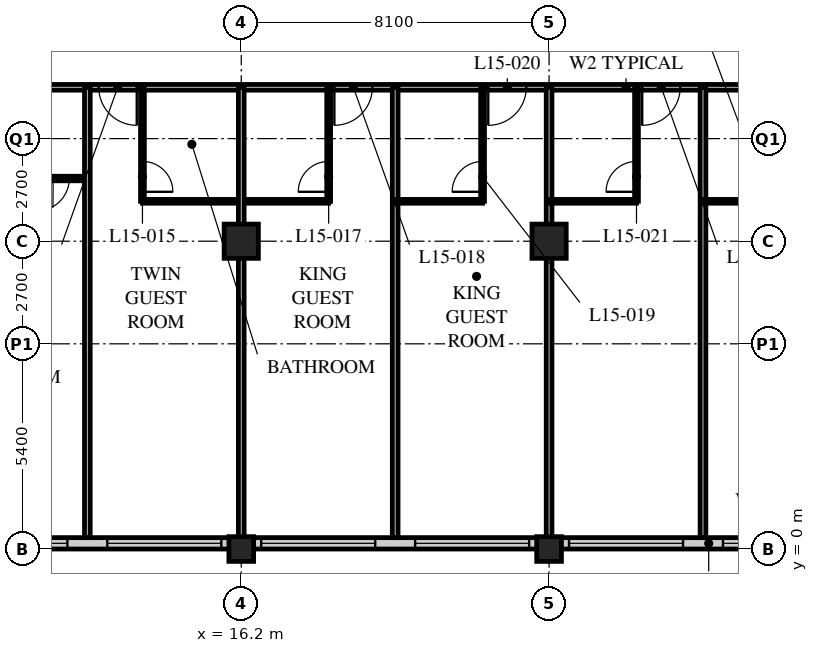
"""IFC4 building model, lengths in metres.
Left out: names, types, materials, properties, quantities, classifications, styles, units other than length and angle.
Written with IfcOpenShell. Run it as: python <this file> out.ifc"""

import sys

from ifc_helpers import new_model, si_unit, direction, frame, frame_2d, origin, origin_2d, place, context, subcontext, project, spatial, rectangle, hollow_rectangle, extrude, element, fill, save


model = new_model("IFC4")
c1 = context("Model", 3, precision=1e-05, world=origin(), true_north=direction((0.0, 1.0)))
c2 = subcontext(c1, "Body", "Model", "MODEL_VIEW")
j1 = project(units=[si_unit("LENGTHUNIT", "METRE"), si_unit("PLANEANGLEUNIT", "RADIAN")], contexts=[c1])
p1 = place(None, origin())
s1 = spatial("IfcSite", under=j1, at=p1, CompositionType="ELEMENT")
p2 = place(p1, origin())
s2 = spatial("IfcBuilding", under=s1, at=p2, CompositionType="ELEMENT")
p3 = place(p2, frame((0.0, 0.0, 63.6)))
s3 = spatial("IfcBuildingStorey", under=s2, at=p3, CompositionType="ELEMENT", Elevation=63.6)
p4 = place(p3, frame((16.2, 0.0, 0.0), z_axis=(0.0, 0.0, 1.0), x_axis=(1.0, 0.0, 0.0)))
e1 = element("IfcColumn", 1, at=p4, inside=s3, PredefinedType="COLUMN", context=c2, shape_type="SweptSolid", body=[
    extrude(hollow_rectangle(XDim=0.65, YDim=0.65, WallThickness=0.05, at=origin_2d()), origin(), (0.0, 0.0, 1.0), 3.4),
])
p5 = place(p3, frame((16.2, 8.1, 0.0), z_axis=(0.0, 0.0, 1.0), x_axis=(1.0, 0.0, 0.0)))
e2 = element("IfcColumn", 2, at=p5, inside=s3, PredefinedType="COLUMN", context=c2, shape_type="SweptSolid", body=[
    extrude(hollow_rectangle(XDim=0.9, YDim=0.9, WallThickness=0.09, at=origin_2d()), origin(), (0.0, 0.0, 1.0), 3.4),
])
p6 = place(p3, frame((24.3, 0.0, 0.0), z_axis=(0.0, 0.0, 1.0), x_axis=(1.0, 0.0, 0.0)))
e3 = element("IfcColumn", 3, at=p6, inside=s3, PredefinedType="COLUMN", context=c2, shape_type="SweptSolid", body=[
    extrude(hollow_rectangle(XDim=0.65, YDim=0.65, WallThickness=0.05, at=origin_2d()), origin(), (0.0, 0.0, 1.0), 3.4),
])
p7 = place(p3, frame((24.3, 8.1, 0.0), z_axis=(0.0, 0.0, 1.0), x_axis=(1.0, 0.0, 0.0)))
e4 = element("IfcColumn", 4, at=p7, inside=s3, PredefinedType="COLUMN", context=c2, shape_type="SweptSolid", body=[
    extrude(hollow_rectangle(XDim=0.9, YDim=0.9, WallThickness=0.09, at=origin_2d()), origin(), (0.0, 0.0, 1.0), 3.4),
])
p8 = place(p3, frame((8.4, 0.15, 0.0), z_axis=(0.0, 0.0, 1.0), x_axis=(1.0, 0.0, 0.0)))
e5 = element("IfcWall", 5, at=p8, inside=s3, PredefinedType="SOLIDWALL", context=c2, shape_type="SweptSolid", body=[
    extrude(rectangle(XDim=40.2, YDim=0.3, at=frame_2d((20.1, 0.0))), origin(), (0.0, 0.0, 1.0), 3.19),
])
p9 = place(p8, frame((0.225, 0.0, 0.9)))
e6 = element("IfcOpeningElement", 6, at=p9, cuts=e5, PredefinedType="OPENING", context=c2, shape_type="SweptSolid", body=[
    extrude(rectangle(XDim=3.0, YDim=2.0, at=frame_2d((1.5, 1.0))), frame((0.0, 0.16, 0.0), z_axis=(0.0, -1.0, 0.0), x_axis=(1.0, 0.0, 0.0)), (0.0, 0.0, 1.0), 0.32),
])
p10 = place(p8, frame((4.275, 0.0, 0.9)))
e7 = element("IfcOpeningElement", 7, at=p10, cuts=e5, PredefinedType="OPENING", context=c2, shape_type="SweptSolid", body=[
    extrude(rectangle(XDim=3.0, YDim=2.0, at=frame_2d((1.5, 1.0))), frame((0.0, 0.16, 0.0), z_axis=(0.0, -1.0, 0.0), x_axis=(1.0, 0.0, 0.0)), (0.0, 0.0, 1.0), 0.32),
])
p11 = place(p8, frame((8.325, 0.0, 0.9)))
e8 = element("IfcOpeningElement", 8, at=p11, cuts=e5, PredefinedType="OPENING", context=c2, shape_type="SweptSolid", body=[
    extrude(rectangle(XDim=3.0, YDim=2.0, at=frame_2d((1.5, 1.0))), frame((0.0, 0.16, 0.0), z_axis=(0.0, -1.0, 0.0), x_axis=(1.0, 0.0, 0.0)), (0.0, 0.0, 1.0), 0.32),
])
p12 = place(p8, frame((12.375, 0.0, 0.9)))
e9 = element("IfcOpeningElement", 9, at=p12, cuts=e5, PredefinedType="OPENING", context=c2, shape_type="SweptSolid", body=[
    extrude(rectangle(XDim=3.0, YDim=2.0, at=frame_2d((1.5, 1.0))), frame((0.0, 0.16, 0.0), z_axis=(0.0, -1.0, 0.0), x_axis=(1.0, 0.0, 0.0)), (0.0, 0.0, 1.0), 0.32),
])
p13 = place(p8, frame((16.425, 0.0, 0.9)))
e10 = element("IfcOpeningElement", 10, at=p13, cuts=e5, PredefinedType="OPENING", context=c2, shape_type="SweptSolid", body=[
    extrude(rectangle(XDim=3.0, YDim=2.0, at=frame_2d((1.5, 1.0))), frame((0.0, 0.16, 0.0), z_axis=(0.0, -1.0, 0.0), x_axis=(1.0, 0.0, 0.0)), (0.0, 0.0, 1.0), 0.32),
])
p14 = place(p8, frame((20.475, 0.0, 0.9)))
e11 = element("IfcOpeningElement", 11, at=p14, cuts=e5, PredefinedType="OPENING", context=c2, shape_type="SweptSolid", body=[
    extrude(rectangle(XDim=3.0, YDim=2.0, at=frame_2d((1.5, 1.0))), frame((0.0, 0.16, 0.0), z_axis=(0.0, -1.0, 0.0), x_axis=(1.0, 0.0, 0.0)), (0.0, 0.0, 1.0), 0.32),
])
p15 = place(p8, frame((24.525, 0.0, 0.9)))
e12 = element("IfcOpeningElement", 12, at=p15, cuts=e5, PredefinedType="OPENING", context=c2, shape_type="SweptSolid", body=[
    extrude(rectangle(XDim=3.0, YDim=2.0, at=frame_2d((1.5, 1.0))), frame((0.0, 0.16, 0.0), z_axis=(0.0, -1.0, 0.0), x_axis=(1.0, 0.0, 0.0)), (0.0, 0.0, 1.0), 0.32),
])
p16 = place(p8, frame((28.575, 0.0, 0.9)))
e13 = element("IfcOpeningElement", 13, at=p16, cuts=e5, PredefinedType="OPENING", context=c2, shape_type="SweptSolid", body=[
    extrude(rectangle(XDim=3.0, YDim=2.0, at=frame_2d((1.5, 1.0))), frame((0.0, 0.16, 0.0), z_axis=(0.0, -1.0, 0.0), x_axis=(1.0, 0.0, 0.0)), (0.0, 0.0, 1.0), 0.32),
])
p17 = place(p8, frame((32.625, 0.0, 0.9)))
e14 = element("IfcOpeningElement", 14, at=p17, cuts=e5, PredefinedType="OPENING", context=c2, shape_type="SweptSolid", body=[
    extrude(rectangle(XDim=3.0, YDim=2.0, at=frame_2d((1.5, 1.0))), frame((0.0, 0.16, 0.0), z_axis=(0.0, -1.0, 0.0), x_axis=(1.0, 0.0, 0.0)), (0.0, 0.0, 1.0), 0.32),
])
p18 = place(p8, frame((36.675, 0.0, 0.9)))
e15 = element("IfcOpeningElement", 15, at=p18, cuts=e5, PredefinedType="OPENING", context=c2, shape_type="SweptSolid", body=[
    extrude(rectangle(XDim=3.0, YDim=2.0, at=frame_2d((1.5, 1.0))), frame((0.0, 0.16, 0.0), z_axis=(0.0, -1.0, 0.0), x_axis=(1.0, 0.0, 0.0)), (0.0, 0.0, 1.0), 0.32),
])
p19 = place(p3, frame((8.1, 12.15, 0.0), z_axis=(0.0, 0.0, 1.0), x_axis=(1.0, 0.0, 0.0)))
e16 = element("IfcWall", 16, at=p19, inside=s3, PredefinedType="PARTITIONING", context=c2, shape_type="SweptSolid", body=[
    extrude(rectangle(XDim=36.45, YDim=0.15, at=frame_2d((18.225, 0.0))), origin(), (0.0, 0.0, 1.0), 3.19),
])
p20 = place(p19, frame((4.35, 0.0, 0.0)))
e17 = element("IfcOpeningElement", 17, at=p20, cuts=e16, PredefinedType="OPENING", context=c2, shape_type="SweptSolid", body=[
    extrude(rectangle(XDim=1.0, YDim=2.1, at=frame_2d((0.5, 1.05))), frame((0.0, 0.085, 0.0), z_axis=(0.0, -1.0, 0.0), x_axis=(1.0, 0.0, 0.0)), (0.0, 0.0, 1.0), 0.17),
])
p21 = place(p19, frame((10.55, 0.0, 0.0)))
e18 = element("IfcOpeningElement", 18, at=p21, cuts=e16, PredefinedType="OPENING", context=c2, shape_type="SweptSolid", body=[
    extrude(rectangle(XDim=1.0, YDim=2.1, at=frame_2d((0.5, 1.05))), frame((0.0, 0.085, 0.0), z_axis=(0.0, -1.0, 0.0), x_axis=(1.0, 0.0, 0.0)), (0.0, 0.0, 1.0), 0.17),
])
p22 = place(p19, frame((14.6, 0.0, 0.0)))
e19 = element("IfcOpeningElement", 19, at=p22, cuts=e16, PredefinedType="OPENING", context=c2, shape_type="SweptSolid", body=[
    extrude(rectangle(XDim=1.0, YDim=2.1, at=frame_2d((0.5, 1.05))), frame((0.0, 0.085, 0.0), z_axis=(0.0, -1.0, 0.0), x_axis=(1.0, 0.0, 0.0)), (0.0, 0.0, 1.0), 0.17),
])
p23 = place(p19, frame((18.65, 0.0, 0.0)))
e20 = element("IfcOpeningElement", 20, at=p23, cuts=e16, PredefinedType="OPENING", context=c2, shape_type="SweptSolid", body=[
    extrude(rectangle(XDim=1.0, YDim=2.1, at=frame_2d((0.5, 1.05))), frame((0.0, 0.085, 0.0), z_axis=(0.0, -1.0, 0.0), x_axis=(1.0, 0.0, 0.0)), (0.0, 0.0, 1.0), 0.17),
])
p24 = place(p19, frame((22.7, 0.0, 0.0)))
e21 = element("IfcOpeningElement", 21, at=p24, cuts=e16, PredefinedType="OPENING", context=c2, shape_type="SweptSolid", body=[
    extrude(rectangle(XDim=1.0, YDim=2.1, at=frame_2d((0.5, 1.05))), frame((0.0, 0.085, 0.0), z_axis=(0.0, -1.0, 0.0), x_axis=(1.0, 0.0, 0.0)), (0.0, 0.0, 1.0), 0.17),
])
p25 = place(p19, frame((24.6, 0.0, 0.0)))
e22 = element("IfcOpeningElement", 22, at=p25, cuts=e16, PredefinedType="OPENING", context=c2, shape_type="SweptSolid", body=[
    extrude(rectangle(XDim=1.0, YDim=2.1, at=frame_2d((0.5, 1.05))), frame((0.0, 0.085, 0.0), z_axis=(0.0, -1.0, 0.0), x_axis=(1.0, 0.0, 0.0)), (0.0, 0.0, 1.0), 0.17),
])
p26 = place(p19, frame((30.8, 0.0, 0.0)))
e23 = element("IfcOpeningElement", 23, at=p26, cuts=e16, PredefinedType="OPENING", context=c2, shape_type="SweptSolid", body=[
    extrude(rectangle(XDim=1.0, YDim=2.1, at=frame_2d((0.5, 1.05))), frame((0.0, 0.085, 0.0), z_axis=(0.0, -1.0, 0.0), x_axis=(1.0, 0.0, 0.0)), (0.0, 0.0, 1.0), 0.17),
])
p27 = place(p19, frame((1.525, 0.0, 0.0)))
e24 = element("IfcOpeningElement", 24, at=p27, cuts=e16, PredefinedType="OPENING", context=c2, shape_type="SweptSolid", body=[
    extrude(rectangle(XDim=1.0, YDim=2.1, at=frame_2d((0.5, 1.05))), frame((0.0, 0.085, 0.0), z_axis=(0.0, -1.0, 0.0), x_axis=(1.0, 0.0, 0.0)), (0.0, 0.0, 1.0), 0.17),
])
p28 = place(p19, frame((33.925, 0.0, 0.0)))
e25 = element("IfcOpeningElement", 25, at=p28, cuts=e16, PredefinedType="OPENING", context=c2, shape_type="SweptSolid", body=[
    extrude(rectangle(XDim=1.0, YDim=2.1, at=frame_2d((0.5, 1.05))), frame((0.0, 0.085, 0.0), z_axis=(0.0, -1.0, 0.0), x_axis=(1.0, 0.0, 0.0)), (0.0, 0.0, 1.0), 0.17),
])
p29 = place(p3, frame((13.6, 9.15, 0.0), z_axis=(0.0, 0.0, 1.0), x_axis=(1.0, 0.0, 0.0)))
e26 = element("IfcWall", 26, at=p29, inside=s3, PredefinedType="PARTITIONING", context=c2, shape_type="SweptSolid", body=[
    extrude(rectangle(XDim=4.9, YDim=0.1, at=frame_2d((2.45, 0.0))), origin(), (0.0, 0.0, 1.0), 3.19),
])
p30 = place(p3, frame((13.6, 12.15, 0.0), z_axis=(0.0, 0.0, 1.0), x_axis=(0.0, -1.0, 0.0)))
e27 = element("IfcWall", 27, at=p30, inside=s3, PredefinedType="PARTITIONING", context=c2, shape_type="SweptSolid", body=[
    extrude(rectangle(XDim=3.0, YDim=0.1, at=frame_2d((1.5, 0.0))), origin(), (0.0, 0.0, 1.0), 3.19),
])
p31 = place(p30, frame((1.95, 0.0, 0.0)))
e28 = element("IfcOpeningElement", 28, at=p31, cuts=e27, PredefinedType="OPENING", context=c2, shape_type="SweptSolid", body=[
    extrude(rectangle(XDim=0.8, YDim=2.1, at=frame_2d((0.4, 1.05))), frame((0.0, 0.06, 0.0), z_axis=(0.0, -1.0, 0.0), x_axis=(1.0, 0.0, 0.0)), (0.0, 0.0, 1.0), 0.12),
])
p32 = place(p3, frame((16.2, 12.15, 0.0), z_axis=(0.0, 0.0, 1.0), x_axis=(0.0, -1.0, 0.0)))
e29 = element("IfcWall", 29, at=p32, inside=s3, PredefinedType="PARTITIONING", context=c2, shape_type="SweptSolid", body=[
    extrude(rectangle(XDim=11.85, YDim=0.15, at=frame_2d((5.925, 0.0))), origin(), (0.0, 0.0, 1.0), 2.578),
])
p33 = place(p3, frame((18.5, 12.15, 0.0), z_axis=(0.0, 0.0, 1.0), x_axis=(0.0, -1.0, 0.0)))
e30 = element("IfcWall", 30, at=p33, inside=s3, PredefinedType="PARTITIONING", context=c2, shape_type="SweptSolid", body=[
    extrude(rectangle(XDim=3.0, YDim=0.1, at=frame_2d((1.5, 0.0))), origin(), (0.0, 0.0, 1.0), 3.19),
])
p34 = place(p33, frame((1.95, 0.0, 0.0)))
e31 = element("IfcOpeningElement", 31, at=p34, cuts=e30, PredefinedType="OPENING", context=c2, shape_type="SweptSolid", body=[
    extrude(rectangle(XDim=0.8, YDim=2.1, at=frame_2d((0.4, 1.05))), frame((0.0, 0.06, 0.0), z_axis=(0.0, -1.0, 0.0), x_axis=(1.0, 0.0, 0.0)), (0.0, 0.0, 1.0), 0.12),
])
p35 = place(p3, frame((20.25, 12.15, 0.0), z_axis=(0.0, 0.0, 1.0), x_axis=(0.0, -1.0, 0.0)))
e32 = element("IfcWall", 32, at=p35, inside=s3, PredefinedType="PARTITIONING", context=c2, shape_type="SweptSolid", body=[
    extrude(rectangle(XDim=11.85, YDim=0.15, at=frame_2d((5.925, 0.0))), origin(), (0.0, 0.0, 1.0), 3.19),
])
p36 = place(p3, frame((20.25, 9.15, 0.0), z_axis=(0.0, 0.0, 1.0), x_axis=(1.0, 0.0, 0.0)))
e33 = element("IfcWall", 33, at=p36, inside=s3, PredefinedType="PARTITIONING", context=c2, shape_type="SweptSolid", body=[
    extrude(rectangle(XDim=2.3, YDim=0.1, at=frame_2d((1.15, 0.0))), origin(), (0.0, 0.0, 1.0), 3.19),
])
p37 = place(p3, frame((22.55, 12.15, 0.0), z_axis=(0.0, 0.0, 1.0), x_axis=(0.0, -1.0, 0.0)))
e34 = element("IfcWall", 34, at=p37, inside=s3, PredefinedType="PARTITIONING", context=c2, shape_type="SweptSolid", body=[
    extrude(rectangle(XDim=3.0, YDim=0.1, at=frame_2d((1.5, 0.0))), origin(), (0.0, 0.0, 1.0), 3.19),
])
p38 = place(p37, frame((1.95, 0.0, 0.0)))
e35 = element("IfcOpeningElement", 35, at=p38, cuts=e34, PredefinedType="OPENING", context=c2, shape_type="SweptSolid", body=[
    extrude(rectangle(XDim=0.8, YDim=2.1, at=frame_2d((0.4, 1.05))), frame((0.0, 0.06, 0.0), z_axis=(0.0, -1.0, 0.0), x_axis=(1.0, 0.0, 0.0)), (0.0, 0.0, 1.0), 0.12),
])
p39 = place(p3, frame((24.3, 12.15, 0.0), z_axis=(0.0, 0.0, 1.0), x_axis=(0.0, -1.0, 0.0)))
e36 = element("IfcWall", 36, at=p39, inside=s3, PredefinedType="PARTITIONING", context=c2, shape_type="SweptSolid", body=[
    extrude(rectangle(XDim=11.85, YDim=0.15, at=frame_2d((5.925, 0.0))), origin(), (0.0, 0.0, 1.0), 2.578),
])
p40 = place(p3, frame((24.3, 9.15, 0.0), z_axis=(0.0, 0.0, 1.0), x_axis=(1.0, 0.0, 0.0)))
e37 = element("IfcWall", 37, at=p40, inside=s3, PredefinedType="PARTITIONING", context=c2, shape_type="SweptSolid", body=[
    extrude(rectangle(XDim=2.3, YDim=0.1, at=frame_2d((1.15, 0.0))), origin(), (0.0, 0.0, 1.0), 3.19),
])
p41 = place(p3, frame((26.6, 12.15, 0.0), z_axis=(0.0, 0.0, 1.0), x_axis=(0.0, -1.0, 0.0)))
e38 = element("IfcWall", 38, at=p41, inside=s3, PredefinedType="PARTITIONING", context=c2, shape_type="SweptSolid", body=[
    extrude(rectangle(XDim=3.0, YDim=0.1, at=frame_2d((1.5, 0.0))), origin(), (0.0, 0.0, 1.0), 3.19),
])
p42 = place(p41, frame((1.95, 0.0, 0.0)))
e39 = element("IfcOpeningElement", 39, at=p42, cuts=e38, PredefinedType="OPENING", context=c2, shape_type="SweptSolid", body=[
    extrude(rectangle(XDim=0.8, YDim=2.1, at=frame_2d((0.4, 1.05))), frame((0.0, 0.06, 0.0), z_axis=(0.0, -1.0, 0.0), x_axis=(1.0, 0.0, 0.0)), (0.0, 0.0, 1.0), 0.12),
])
p43 = place(p3, frame((28.35, 12.15, 0.0), z_axis=(0.0, 0.0, 1.0), x_axis=(0.0, -1.0, 0.0)))
e40 = element("IfcWall", 40, at=p43, inside=s3, PredefinedType="PARTITIONING", context=c2, shape_type="SweptSolid", body=[
    extrude(rectangle(XDim=11.85, YDim=0.15, at=frame_2d((5.925, 0.0))), origin(), (0.0, 0.0, 1.0), 3.19),
])
p44 = place(p3, frame((28.35, 9.15, 0.0), z_axis=(0.0, 0.0, 1.0), x_axis=(1.0, 0.0, 0.0)))
e41 = element("IfcWall", 41, at=p44, inside=s3, PredefinedType="PARTITIONING", context=c2, shape_type="SweptSolid", body=[
    extrude(rectangle(XDim=2.3, YDim=0.1, at=frame_2d((1.15, 0.0))), origin(), (0.0, 0.0, 1.0), 3.19),
])
p45 = place(p3, frame((4.1, 9.75, 0.0), z_axis=(0.0, 0.0, 1.0), x_axis=(1.0, 0.0, 0.0)))
e42 = element("IfcWall", 42, at=p45, inside=s3, PredefinedType="PARTITIONING", context=c2, shape_type="SweptSolid", body=[
    extrude(rectangle(XDim=8.05, YDim=0.12, at=frame_2d((4.025, 0.0))), origin(), (0.0, 0.0, 1.0), 3.19),
])
p46 = place(p45, frame((6.725, 0.0, 0.0)))
e43 = element("IfcOpeningElement", 43, at=p46, cuts=e42, PredefinedType="OPENING", context=c2, shape_type="SweptSolid", body=[
    extrude(rectangle(XDim=0.85, YDim=2.1, at=frame_2d((0.425, 1.05))), frame((0.0, 0.07, 0.0), z_axis=(0.0, -1.0, 0.0), x_axis=(1.0, 0.0, 0.0)), (0.0, 0.0, 1.0), 0.14),
])
p47 = place(p45, frame((2.875, 0.0, 0.0)))
e44 = element("IfcOpeningElement", 44, at=p47, cuts=e42, PredefinedType="OPENING", context=c2, shape_type="SweptSolid", body=[
    extrude(rectangle(XDim=0.85, YDim=2.1, at=frame_2d((0.425, 1.05))), frame((0.0, 0.07, 0.0), z_axis=(0.0, -1.0, 0.0), x_axis=(1.0, 0.0, 0.0)), (0.0, 0.0, 1.0), 0.14),
])
p48 = place(p3, frame((12.15, 12.15, 0.0), z_axis=(0.0, 0.0, 1.0), x_axis=(0.0, -1.0, 0.0)))
e45 = element("IfcWall", 45, at=p48, inside=s3, PredefinedType="PARTITIONING", context=c2, shape_type="SweptSolid", body=[
    extrude(rectangle(XDim=11.85, YDim=0.15, at=frame_2d((5.925, 0.0))), origin(), (0.0, 0.0, 1.0), 3.19),
])
p49 = place(p9, origin())
e46 = element("IfcWindow", 46, at=p49, inside=s3, PartitioningType="SINGLE_PANEL", PredefinedType="WINDOW", context=c2, shape_type="SweptSolid", body=[
    extrude(rectangle(XDim=3.0, YDim=2.0, at=frame_2d((1.5, 1.0))), frame((0.0, 0.03, 0.0), z_axis=(0.0, -1.0, 0.0), x_axis=(1.0, 0.0, 0.0)), (0.0, 0.0, 1.0), 0.06),
])
fill(e6, e46)
p50 = place(p10, origin())
e47 = element("IfcWindow", 47, at=p50, inside=s3, PartitioningType="SINGLE_PANEL", PredefinedType="WINDOW", context=c2, shape_type="SweptSolid", body=[
    extrude(rectangle(XDim=3.0, YDim=2.0, at=frame_2d((1.5, 1.0))), frame((0.0, 0.03, 0.0), z_axis=(0.0, -1.0, 0.0), x_axis=(1.0, 0.0, 0.0)), (0.0, 0.0, 1.0), 0.06),
])
fill(e7, e47)
p51 = place(p11, origin())
e48 = element("IfcWindow", 48, at=p51, inside=s3, PartitioningType="SINGLE_PANEL", PredefinedType="WINDOW", context=c2, shape_type="SweptSolid", body=[
    extrude(rectangle(XDim=3.0, YDim=2.0, at=frame_2d((1.5, 1.0))), frame((0.0, 0.03, 0.0), z_axis=(0.0, -1.0, 0.0), x_axis=(1.0, 0.0, 0.0)), (0.0, 0.0, 1.0), 0.06),
])
fill(e8, e48)
p52 = place(p12, origin())
e49 = element("IfcWindow", 49, at=p52, inside=s3, PartitioningType="SINGLE_PANEL", PredefinedType="WINDOW", context=c2, shape_type="SweptSolid", body=[
    extrude(rectangle(XDim=3.0, YDim=2.0, at=frame_2d((1.5, 1.0))), frame((0.0, 0.03, 0.0), z_axis=(0.0, -1.0, 0.0), x_axis=(1.0, 0.0, 0.0)), (0.0, 0.0, 1.0), 0.06),
])
fill(e9, e49)
p53 = place(p13, origin())
e50 = element("IfcWindow", 50, at=p53, inside=s3, PartitioningType="SINGLE_PANEL", PredefinedType="WINDOW", context=c2, shape_type="SweptSolid", body=[
    extrude(rectangle(XDim=3.0, YDim=2.0, at=frame_2d((1.5, 1.0))), frame((0.0, 0.03, 0.0), z_axis=(0.0, -1.0, 0.0), x_axis=(1.0, 0.0, 0.0)), (0.0, 0.0, 1.0), 0.06),
])
fill(e10, e50)
p54 = place(p14, origin())
e51 = element("IfcWindow", 51, at=p54, inside=s3, PartitioningType="SINGLE_PANEL", PredefinedType="WINDOW", context=c2, shape_type="SweptSolid", body=[
    extrude(rectangle(XDim=3.0, YDim=2.0, at=frame_2d((1.5, 1.0))), frame((0.0, 0.03, 0.0), z_axis=(0.0, -1.0, 0.0), x_axis=(1.0, 0.0, 0.0)), (0.0, 0.0, 1.0), 0.06),
])
fill(e11, e51)
p55 = place(p31, origin())
e52 = element("IfcDoor", 52, at=p55, inside=s3, OperationType="SINGLE_SWING_RIGHT", PredefinedType="DOOR", context=c2, shape_type="SweptSolid", body=[
    extrude(rectangle(XDim=0.8, YDim=2.1, at=frame_2d((0.4, 1.05))), frame((0.0, 0.025, 0.0), z_axis=(0.0, -1.0, 0.0), x_axis=(1.0, 0.0, 0.0)), (0.0, 0.0, 1.0), 0.05),
])
fill(e28, e52)
p56 = place(p20, origin())
e53 = element("IfcDoor", 53, at=p56, inside=s3, OperationType="SINGLE_SWING_LEFT", PredefinedType="DOOR", context=c2, shape_type="SweptSolid", body=[
    extrude(rectangle(XDim=1.0, YDim=2.1, at=frame_2d((0.5, 1.05))), frame((0.0, 0.025, 0.0), z_axis=(0.0, -1.0, 0.0), x_axis=(1.0, 0.0, 0.0)), (0.0, 0.0, 1.0), 0.05),
])
fill(e17, e53)
p57 = place(p34, origin())
e54 = element("IfcDoor", 54, at=p57, inside=s3, OperationType="SINGLE_SWING_LEFT", PredefinedType="DOOR", context=c2, shape_type="SweptSolid", body=[
    extrude(rectangle(XDim=0.8, YDim=2.1, at=frame_2d((0.4, 1.05))), frame((0.0, 0.025, 0.0), z_axis=(0.0, -1.0, 0.0), x_axis=(1.0, 0.0, 0.0)), (0.0, 0.0, 1.0), 0.05),
])
fill(e31, e54)
p58 = place(p21, origin())
e55 = element("IfcDoor", 55, at=p58, inside=s3, OperationType="SINGLE_SWING_RIGHT", PredefinedType="DOOR", context=c2, shape_type="SweptSolid", body=[
    extrude(rectangle(XDim=1.0, YDim=2.1, at=frame_2d((0.5, 1.05))), frame((0.0, 0.025, 0.0), z_axis=(0.0, -1.0, 0.0), x_axis=(1.0, 0.0, 0.0)), (0.0, 0.0, 1.0), 0.05),
])
fill(e18, e55)
p59 = place(p38, origin())
e56 = element("IfcDoor", 56, at=p59, inside=s3, OperationType="SINGLE_SWING_LEFT", PredefinedType="DOOR", context=c2, shape_type="SweptSolid", body=[
    extrude(rectangle(XDim=0.8, YDim=2.1, at=frame_2d((0.4, 1.05))), frame((0.0, 0.025, 0.0), z_axis=(0.0, -1.0, 0.0), x_axis=(1.0, 0.0, 0.0)), (0.0, 0.0, 1.0), 0.05),
])
fill(e35, e56)
p60 = place(p22, origin())
e57 = element("IfcDoor", 57, at=p60, inside=s3, OperationType="SINGLE_SWING_RIGHT", PredefinedType="DOOR", context=c2, shape_type="SweptSolid", body=[
    extrude(rectangle(XDim=1.0, YDim=2.1, at=frame_2d((0.5, 1.05))), frame((0.0, 0.025, 0.0), z_axis=(0.0, -1.0, 0.0), x_axis=(1.0, 0.0, 0.0)), (0.0, 0.0, 1.0), 0.05),
])
fill(e19, e57)
p61 = place(p42, origin())
e58 = element("IfcDoor", 58, at=p61, inside=s3, OperationType="SINGLE_SWING_LEFT", PredefinedType="DOOR", context=c2, shape_type="SweptSolid", body=[
    extrude(rectangle(XDim=0.8, YDim=2.1, at=frame_2d((0.4, 1.05))), frame((0.0, 0.025, 0.0), z_axis=(0.0, -1.0, 0.0), x_axis=(1.0, 0.0, 0.0)), (0.0, 0.0, 1.0), 0.05),
])
fill(e39, e58)
p62 = place(p23, origin())
e59 = element("IfcDoor", 59, at=p62, inside=s3, OperationType="SINGLE_SWING_RIGHT", PredefinedType="DOOR", context=c2, shape_type="SweptSolid", body=[
    extrude(rectangle(XDim=1.0, YDim=2.1, at=frame_2d((0.5, 1.05))), frame((0.0, 0.025, 0.0), z_axis=(0.0, -1.0, 0.0), x_axis=(1.0, 0.0, 0.0)), (0.0, 0.0, 1.0), 0.05),
])
fill(e20, e59)
p63 = place(p46, origin())
e60 = element("IfcDoor", 60, at=p63, inside=s3, OperationType="SINGLE_SWING_RIGHT", PredefinedType="DOOR", context=c2, shape_type="SweptSolid", body=[
    extrude(rectangle(XDim=0.85, YDim=2.1, at=frame_2d((0.425, 1.05))), frame((0.0, 0.025, 0.0), z_axis=(0.0, -1.0, 0.0), x_axis=(1.0, 0.0, 0.0)), (0.0, 0.0, 1.0), 0.05),
])
fill(e43, e60)
save(model, sys.argv[1])
